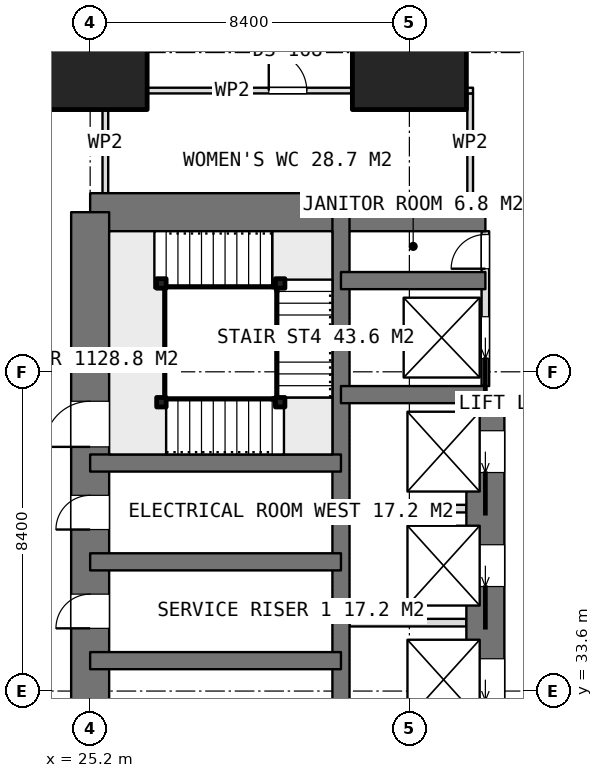
"""IFC4 building model, lengths in metres.
Left out: names, types, materials, properties, quantities, classifications, styles, units other than length and angle.
Written with IfcOpenShell. Run it as: python <this file> out.ifc"""

import sys

from ifc_helpers import new_model, si_unit, direction, frame, frame_2d, origin, origin_2d, place, context, subcontext, project, spatial, rectangle, extrude, element, fill, save


model = new_model("IFC4")
c1 = context("Model", 3, precision=1e-05, world=origin(), true_north=direction((0.0, 1.0)))
c2 = subcontext(c1, "Body", "Model", "MODEL_VIEW")
j1 = project(units=[si_unit("LENGTHUNIT", "METRE"), si_unit("PLANEANGLEUNIT", "RADIAN")], contexts=[c1])
p1 = place(None, origin())
s1 = spatial("IfcSite", under=j1, at=p1, CompositionType="ELEMENT")
p2 = place(p1, origin())
s2 = spatial("IfcBuilding", under=s1, at=p2, CompositionType="ELEMENT")
p3 = place(p2, frame((0.0, 0.0, 155.3)))
s3 = spatial("IfcBuildingStorey", under=s2, at=p3, CompositionType="ELEMENT", Elevation=155.3)
p4 = place(p3, frame((25.2, 46.2, 0.0), z_axis=(0.0, 0.0, 1.0), x_axis=(1.0, 0.0, 0.0)))
e1 = element("IfcWall", 1, at=p4, inside=s3, PredefinedType="SHEAR", context=c2, shape_type="SweptSolid", body=[
    extrude(rectangle(XDim=10.4, YDim=1.0, at=frame_2d((5.2, 0.0))), origin(), (0.0, 0.0, 1.0), 3.75),
])
p5 = place(p3, frame((25.2, 21.0, 0.0), z_axis=(0.0, 0.0, 1.0), x_axis=(0.0, 1.0, 0.0)))
e2 = element("IfcWall", 2, at=p5, inside=s3, PredefinedType="SHEAR", context=c2, shape_type="SweptSolid", body=[
    extrude(rectangle(XDim=25.2, YDim=1.0, at=frame_2d((12.6, 0.0))), origin(), (0.0, 0.0, 1.0), 3.75),
])
p6 = place(p5, frame((7.8, 0.0, 0.0)))
e3 = element("IfcOpeningElement", 3, at=p6, cuts=e2, PredefinedType="OPENING", context=c2, shape_type="SweptSolid", body=[
    extrude(rectangle(XDim=1.2, YDim=2.1, at=frame_2d((0.6, 1.05))), frame((0.0, 0.51, 0.0), z_axis=(0.0, -1.0, 0.0), x_axis=(1.0, 0.0, 0.0)), (0.0, 0.0, 1.0), 1.02),
])
p7 = place(p5, frame((14.25, 0.0, 0.0)))
e4 = element("IfcOpeningElement", 4, at=p7, cuts=e2, PredefinedType="OPENING", context=c2, shape_type="SweptSolid", body=[
    extrude(rectangle(XDim=0.9, YDim=2.1, at=frame_2d((0.45, 1.05))), frame((0.0, 0.51, 0.0), z_axis=(0.0, -1.0, 0.0), x_axis=(1.0, 0.0, 0.0)), (0.0, 0.0, 1.0), 1.02),
])
p8 = place(p5, frame((16.85, 0.0, 0.0)))
e5 = element("IfcOpeningElement", 5, at=p8, cuts=e2, PredefinedType="OPENING", context=c2, shape_type="SweptSolid", body=[
    extrude(rectangle(XDim=0.9, YDim=2.1, at=frame_2d((0.45, 1.05))), frame((0.0, 0.51, 0.0), z_axis=(0.0, -1.0, 0.0), x_axis=(1.0, 0.0, 0.0)), (0.0, 0.0, 1.0), 1.02),
])
p9 = place(p5, frame((19.025, 0.0, 0.0)))
e6 = element("IfcOpeningElement", 6, at=p9, cuts=e2, PredefinedType="OPENING", context=c2, shape_type="SweptSolid", body=[
    extrude(rectangle(XDim=1.2, YDim=2.1, at=frame_2d((0.6, 1.05))), frame((0.0, 0.51, 0.0), z_axis=(0.0, -1.0, 0.0), x_axis=(1.0, 0.0, 0.0)), (0.0, 0.0, 1.0), 1.02),
])
p10 = place(p3, frame((31.8, 21.0, 0.0), z_axis=(0.0, 0.0, 1.0), x_axis=(0.0, 1.0, 0.0)))
e7 = element("IfcWall", 7, at=p10, inside=s3, PredefinedType="SHEAR", context=c2, shape_type="SweptSolid", body=[
    extrude(rectangle(XDim=25.2, YDim=0.45, at=frame_2d((12.6, 0.0))), origin(), (0.0, 0.0, 1.0), 3.75),
])
p11 = place(p3, frame((35.6, 23.4, 0.0), z_axis=(0.0, 0.0, 1.0), x_axis=(0.0, 1.0, 0.0)))
e8 = element("IfcWall", 8, at=p11, inside=s3, PredefinedType="SHEAR", context=c2, shape_type="SweptSolid", body=[
    extrude(rectangle(XDim=18.0, YDim=1.0, at=frame_2d((9.0, 0.0))), origin(), (0.0, 0.0, 1.0), 3.75),
])
p12 = place(p11, frame((0.95, 0.0, 0.0)))
e9 = element("IfcOpeningElement", 9, at=p12, cuts=e8, PredefinedType="OPENING", context=c2, shape_type="SweptSolid", body=[
    extrude(rectangle(XDim=1.1, YDim=2.1, at=frame_2d((0.55, 1.05))), frame((0.0, 0.51, 0.0), z_axis=(0.0, -1.0, 0.0), x_axis=(1.0, 0.0, 0.0)), (0.0, 0.0, 1.0), 1.02),
])
p13 = place(p11, frame((3.95, 0.0, 0.0)))
e10 = element("IfcOpeningElement", 10, at=p13, cuts=e8, PredefinedType="OPENING", context=c2, shape_type="SweptSolid", body=[
    extrude(rectangle(XDim=1.1, YDim=2.1, at=frame_2d((0.55, 1.05))), frame((0.0, 0.51, 0.0), z_axis=(0.0, -1.0, 0.0), x_axis=(1.0, 0.0, 0.0)), (0.0, 0.0, 1.0), 1.02),
])
p14 = place(p11, frame((6.95, 0.0, 0.0)))
e11 = element("IfcOpeningElement", 11, at=p14, cuts=e8, PredefinedType="OPENING", context=c2, shape_type="SweptSolid", body=[
    extrude(rectangle(XDim=1.1, YDim=2.1, at=frame_2d((0.55, 1.05))), frame((0.0, 0.51, 0.0), z_axis=(0.0, -1.0, 0.0), x_axis=(1.0, 0.0, 0.0)), (0.0, 0.0, 1.0), 1.02),
])
p15 = place(p11, frame((9.95, 0.0, 0.0)))
e12 = element("IfcOpeningElement", 12, at=p15, cuts=e8, PredefinedType="OPENING", context=c2, shape_type="SweptSolid", body=[
    extrude(rectangle(XDim=1.1, YDim=2.1, at=frame_2d((0.55, 1.05))), frame((0.0, 0.51, 0.0), z_axis=(0.0, -1.0, 0.0), x_axis=(1.0, 0.0, 0.0)), (0.0, 0.0, 1.0), 1.02),
])
p16 = place(p11, frame((12.95, 0.0, 0.0)))
e13 = element("IfcOpeningElement", 13, at=p16, cuts=e8, PredefinedType="OPENING", context=c2, shape_type="SweptSolid", body=[
    extrude(rectangle(XDim=1.1, YDim=2.1, at=frame_2d((0.55, 1.05))), frame((0.0, 0.51, 0.0), z_axis=(0.0, -1.0, 0.0), x_axis=(1.0, 0.0, 0.0)), (0.0, 0.0, 1.0), 1.02),
])
p17 = place(p11, frame((15.95, 0.0, 0.0)))
e14 = element("IfcOpeningElement", 14, at=p17, cuts=e8, PredefinedType="OPENING", context=c2, shape_type="SweptSolid", body=[
    extrude(rectangle(XDim=1.1, YDim=2.1, at=frame_2d((0.55, 1.05))), frame((0.0, 0.51, 0.0), z_axis=(0.0, -1.0, 0.0), x_axis=(1.0, 0.0, 0.0)), (0.0, 0.0, 1.0), 1.02),
])
for number, where, z_axis, x_axis in (
    (15, (31.8, 41.4, 0.0), (0.0, 0.0, 1.0), (1.0, 0.0, 0.0)),
    (16, (31.8, 44.4, 0.0), (0.0, 0.0, 1.0), (1.0, 0.0, 0.0)),
):
    element("IfcWall", number, at=place(p3, frame(where, z_axis=z_axis, x_axis=x_axis)), inside=s3, PredefinedType="SHEAR", context=c2, shape_type="SweptSolid", body=[
        extrude(rectangle(XDim=3.8, YDim=0.45, at=frame_2d((1.9, 0.0))), origin(), (0.0, 0.0, 1.0), 3.75),
    ])
for number, where, z_axis, x_axis in (
    (17, (25.2, 34.4, 0.0), (0.0, 0.0, 1.0), (1.0, 0.0, 0.0)),
    (18, (25.2, 37.0, 0.0), (0.0, 0.0, 1.0), (1.0, 0.0, 0.0)),
    (19, (25.2, 39.6, 0.0), (0.0, 0.0, 1.0), (1.0, 0.0, 0.0)),
):
    element("IfcWall", number, at=place(p3, frame(where, z_axis=z_axis, x_axis=x_axis)), inside=s3, PredefinedType="SHEAR", context=c2, shape_type="SweptSolid", body=[
        extrude(rectangle(XDim=6.6, YDim=0.45, at=frame_2d((3.3, 0.0))), origin(), (0.0, 0.0, 1.0), 3.75),
    ])
for number, where, z_axis, x_axis in (
    (20, (25.2, 50.4, 0.0), (0.0, 0.0, 1.0), (1.0, 0.0, 0.0)),
    (21, (33.6, 50.4, 0.0), (0.0, 0.0, 1.0), (1.0, 0.0, 0.0)),
):
    element("IfcColumn", number, at=place(p3, frame(where, z_axis=z_axis, x_axis=x_axis)), inside=s3, PredefinedType="COLUMN", context=c2, shape_type="SweptSolid", body=[
        extrude(rectangle(XDim=3.0, YDim=3.0, at=origin_2d()), origin(), (0.0, 0.0, 1.0), 3.75),
    ])
for number, where, z_axis, x_axis in (
    (22, (32.025, 35.4, 0.0), (0.0, 0.0, 1.0), (1.0, 0.0, 0.0)),
    (23, (32.025, 38.4, 0.0), (0.0, 0.0, 1.0), (1.0, 0.0, 0.0)),
):
    element("IfcWall", number, at=place(p3, frame(where, z_axis=z_axis, x_axis=x_axis)), inside=s3, PredefinedType="PARTITIONING", context=c2, shape_type="SweptSolid", body=[
        extrude(rectangle(XDim=3.075, YDim=0.2, at=frame_2d((1.538, 0.0))), origin(), (0.0, 0.0, 1.0), 3.5),
    ])
p18 = place(p3, frame((35.6, 41.625, 0.0), z_axis=(0.0, 0.0, 1.0), x_axis=(0.0, 1.0, 0.0)))
e24 = element("IfcWall", 24, at=p18, inside=s3, PredefinedType="PARTITIONING", context=c2, shape_type="SweptSolid", body=[
    extrude(rectangle(XDim=4.075, YDim=0.2, at=frame_2d((2.038, 0.0))), origin(), (0.0, 0.0, 1.0), 3.5),
])
p19 = place(p18, frame((3.088, 0.0, 0.0)))
e25 = element("IfcOpeningElement", 25, at=p19, cuts=e24, PredefinedType="OPENING", context=c2, shape_type="SweptSolid", body=[
    extrude(rectangle(XDim=0.9, YDim=2.1, at=frame_2d((0.45, 1.05))), frame((0.0, 0.11, 0.0), z_axis=(0.0, -1.0, 0.0), x_axis=(1.0, 0.0, 0.0)), (0.0, 0.0, 1.0), 0.22),
])
p20 = place(p18, frame((0.725, 0.0, 0.0)))
e26 = element("IfcOpeningElement", 26, at=p20, cuts=e24, PredefinedType="OPENING", context=c2, shape_type="SweptSolid", body=[
    extrude(rectangle(XDim=1.1, YDim=2.1, at=frame_2d((0.55, 1.05))), frame((0.0, 0.11, 0.0), z_axis=(0.0, -1.0, 0.0), x_axis=(1.0, 0.0, 0.0)), (0.0, 0.0, 1.0), 0.22),
])
p21 = place(p3, frame((25.525, 49.4, 0.0), z_axis=(0.0, 0.0, 1.0), x_axis=(1.0, 0.0, 0.0)))
e27 = element("IfcWall", 27, at=p21, inside=s3, PredefinedType="PARTITIONING", context=c2, shape_type="SweptSolid", body=[
    extrude(rectangle(XDim=9.75, YDim=0.15, at=frame_2d((4.875, 0.0))), origin(), (0.0, 0.0, 1.0), 3.5),
])
p22 = place(p21, frame((4.375, 0.0, 0.0)))
e28 = element("IfcOpeningElement", 28, at=p22, cuts=e27, PredefinedType="OPENING", context=c2, shape_type="SweptSolid", body=[
    extrude(rectangle(XDim=1.0, YDim=2.1, at=frame_2d((0.5, 1.05))), frame((0.0, 0.085, 0.0), z_axis=(0.0, -1.0, 0.0), x_axis=(1.0, 0.0, 0.0)), (0.0, 0.0, 1.0), 0.17),
])
for number, where, z_axis, x_axis in (
    (29, (25.6, 46.7, 0.0), (0.0, 0.0, 1.0), (0.0, 1.0, 0.0)),
    (30, (35.2, 46.7, 0.0), (0.0, 0.0, 1.0), (0.0, 1.0, 0.0)),
):
    element("IfcWall", number, at=place(p3, frame(where, z_axis=z_axis, x_axis=x_axis)), inside=s3, PredefinedType="PARTITIONING", context=c2, shape_type="SweptSolid", body=[
        extrude(rectangle(XDim=2.625, YDim=0.15, at=frame_2d((1.312, 0.0))), origin(), (0.0, 0.0, 1.0), 3.5),
    ])
for number, where, z_axis, x_axis in (
    (31, (27.075, 41.2, 0.0), (0.0, 0.0, 1.0), (1.0, 0.0, 0.0)),
    (32, (30.2, 41.2, 0.0), (0.0, 0.0, 1.0), (1.0, 0.0, 0.0)),
    (33, (30.2, 44.325, 0.0), (0.0, 0.0, 1.0), (1.0, 0.0, 0.0)),
    (34, (27.075, 44.325, 0.0), (0.0, 0.0, 1.0), (1.0, 0.0, 0.0)),
):
    element("IfcColumn", number, at=place(p3, frame(where, z_axis=z_axis, x_axis=x_axis)), inside=s3, PredefinedType="COLUMN", context=c2, shape_type="SweptSolid", body=[
        extrude(rectangle(XDim=0.25, YDim=0.25, at=origin_2d()), origin(), (0.0, 0.0, 1.0), 3.75),
    ])
p23 = place(p7, origin())
e35 = element("IfcDoor", 35, at=p23, inside=s3, OperationType="SINGLE_SWING_LEFT", PredefinedType="DOOR", context=c2, shape_type="SweptSolid", body=[
    extrude(rectangle(XDim=0.9, YDim=2.1, at=frame_2d((0.45, 1.05))), frame((0.0, 0.025, 0.0), z_axis=(0.0, -1.0, 0.0), x_axis=(1.0, 0.0, 0.0)), (0.0, 0.0, 1.0), 0.05),
])
fill(e4, e35)
p24 = place(p8, origin())
e36 = element("IfcDoor", 36, at=p24, inside=s3, OperationType="SINGLE_SWING_LEFT", PredefinedType="DOOR", context=c2, shape_type="SweptSolid", body=[
    extrude(rectangle(XDim=0.9, YDim=2.1, at=frame_2d((0.45, 1.05))), frame((0.0, 0.025, 0.0), z_axis=(0.0, -1.0, 0.0), x_axis=(1.0, 0.0, 0.0)), (0.0, 0.0, 1.0), 0.05),
])
fill(e5, e36)
p25 = place(p19, origin())
e37 = element("IfcDoor", 37, at=p25, inside=s3, OperationType="SINGLE_SWING_LEFT", PredefinedType="DOOR", context=c2, shape_type="SweptSolid", body=[
    extrude(rectangle(XDim=0.9, YDim=2.1, at=frame_2d((0.45, 1.05))), frame((0.0, 0.025, 0.0), z_axis=(0.0, -1.0, 0.0), x_axis=(1.0, 0.0, 0.0)), (0.0, 0.0, 1.0), 0.05),
])
fill(e25, e37)
p26 = place(p15, origin())
e38 = element("IfcDoor", 38, at=p26, inside=s3, OperationType="SLIDING_TO_LEFT", PredefinedType="USERDEFINED", context=c2, shape_type="SweptSolid", body=[
    extrude(rectangle(XDim=1.1, YDim=2.1, at=frame_2d((0.55, 1.05))), frame((0.0, 0.025, 0.0), z_axis=(0.0, -1.0, 0.0), x_axis=(1.0, 0.0, 0.0)), (0.0, 0.0, 1.0), 0.05),
])
fill(e12, e38)
p27 = place(p16, origin())
e39 = element("IfcDoor", 39, at=p27, inside=s3, OperationType="SLIDING_TO_LEFT", PredefinedType="USERDEFINED", context=c2, shape_type="SweptSolid", body=[
    extrude(rectangle(XDim=1.1, YDim=2.1, at=frame_2d((0.55, 1.05))), frame((0.0, 0.025, 0.0), z_axis=(0.0, -1.0, 0.0), x_axis=(1.0, 0.0, 0.0)), (0.0, 0.0, 1.0), 0.05),
])
fill(e13, e39)
p28 = place(p17, origin())
e40 = element("IfcDoor", 40, at=p28, inside=s3, OperationType="SLIDING_TO_LEFT", PredefinedType="USERDEFINED", context=c2, shape_type="SweptSolid", body=[
    extrude(rectangle(XDim=1.1, YDim=2.1, at=frame_2d((0.55, 1.05))), frame((0.0, 0.025, 0.0), z_axis=(0.0, -1.0, 0.0), x_axis=(1.0, 0.0, 0.0)), (0.0, 0.0, 1.0), 0.05),
])
fill(e14, e40)
p29 = place(p20, origin())
e41 = element("IfcDoor", 41, at=p29, inside=s3, OperationType="SLIDING_TO_LEFT", PredefinedType="USERDEFINED", context=c2, shape_type="SweptSolid", body=[
    extrude(rectangle(XDim=1.1, YDim=2.1, at=frame_2d((0.55, 1.05))), frame((0.0, 0.025, 0.0), z_axis=(0.0, -1.0, 0.0), x_axis=(1.0, 0.0, 0.0)), (0.0, 0.0, 1.0), 0.05),
])
fill(e26, e41)
p30 = place(p22, origin())
e42 = element("IfcDoor", 42, at=p30, inside=s3, OperationType="SINGLE_SWING_LEFT", PredefinedType="DOOR", context=c2, shape_type="SweptSolid", body=[
    extrude(rectangle(XDim=1.0, YDim=2.1, at=frame_2d((0.5, 1.05))), frame((0.0, 0.025, 0.0), z_axis=(0.0, -1.0, 0.0), x_axis=(1.0, 0.0, 0.0)), (0.0, 0.0, 1.0), 0.05),
])
fill(e28, e42)
p31 = place(p9, origin())
e43 = element("IfcDoor", 43, at=p31, inside=s3, OperationType="SINGLE_SWING_RIGHT", PredefinedType="DOOR", context=c2, shape_type="SweptSolid", body=[
    extrude(rectangle(XDim=1.2, YDim=2.1, at=frame_2d((0.6, 1.05))), frame((0.0, 0.025, 0.0), z_axis=(0.0, -1.0, 0.0), x_axis=(1.0, 0.0, 0.0)), (0.0, 0.0, 1.0), 0.05),
])
fill(e6, e43)
save(model, sys.argv[1])
